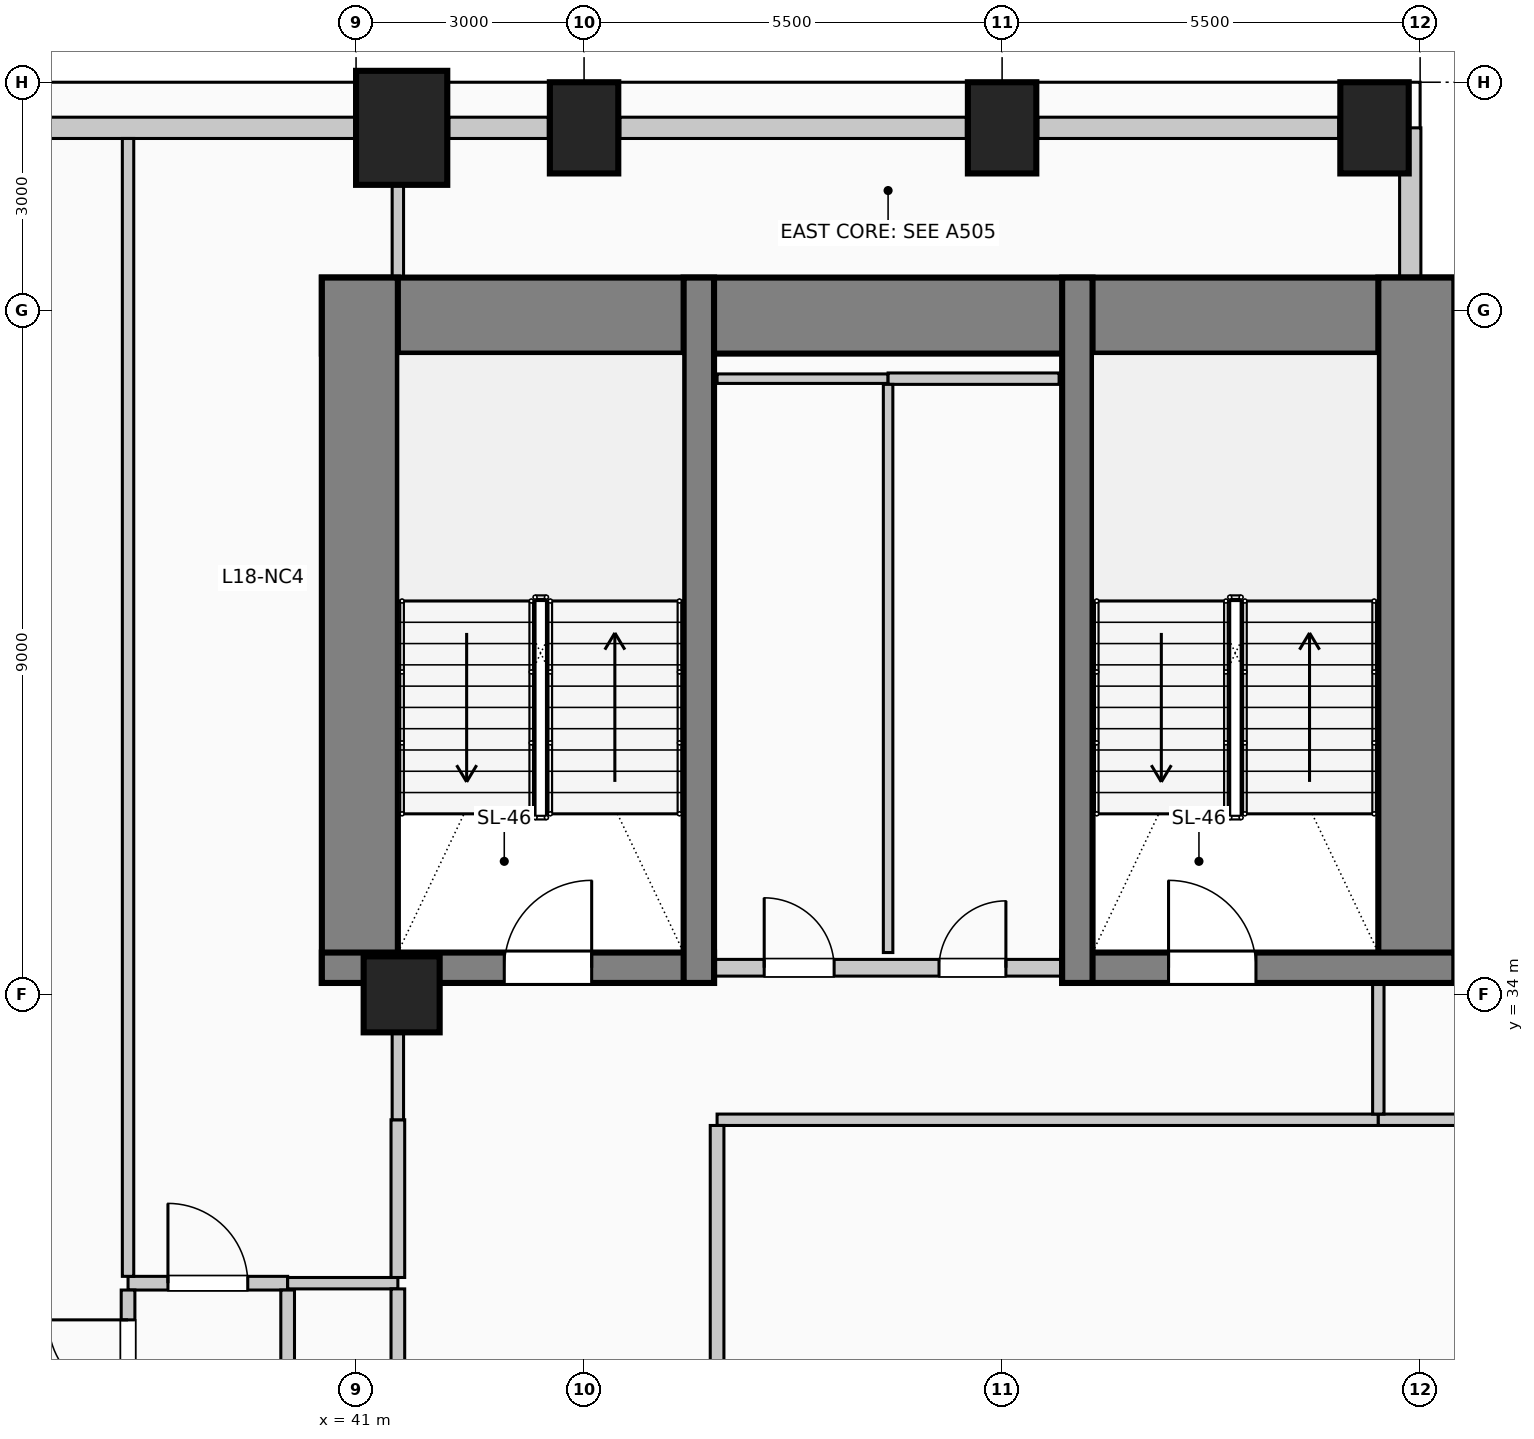
"""IFC4 building model, lengths in metres.
Left out: names, types, materials, properties, quantities, classifications, styles, units other than length and angle.
Written with IfcOpenShell. Run it as: python <this file> out.ifc"""

import sys

from ifc_helpers import new_model, si_unit, direction, frame, frame_2d, origin, origin_2d, place, context, subcontext, project, spatial, rectangle, circle, extrude, element, fill, save


model = new_model("IFC4")
c1 = context("Model", 3, precision=1e-05, world=origin(), true_north=direction((0.0, 1.0)))
c2 = subcontext(c1, "Body", "Model", "MODEL_VIEW")
j1 = project(units=[si_unit("LENGTHUNIT", "METRE"), si_unit("PLANEANGLEUNIT", "RADIAN")], contexts=[c1])
p1 = place(None, origin())
s1 = spatial("IfcSite", under=j1, at=p1, CompositionType="ELEMENT")
p2 = place(p1, origin())
s2 = spatial("IfcBuilding", under=s1, at=p2, CompositionType="ELEMENT")
p3 = place(p2, frame((0.0, 0.0, 74.6)))
s3 = spatial("IfcBuildingStorey", under=s2, at=p3, CompositionType="ELEMENT", Elevation=74.6)
p4 = place(p3, frame((40.55, 42.93, 0.0), z_axis=(0.0, 0.0, 1.0), x_axis=(1.0, 0.0, 0.0)))
e1 = element("IfcWall", 1, at=p4, inside=s3, PredefinedType="SHEAR", context=c2, shape_type="SweptSolid", body=[
    extrude(rectangle(XDim=14.9, YDim=1.0, at=frame_2d((7.45, 0.0))), origin(), (0.0, 0.0, 1.0), 4.0),
])
for number, where, z_axis, x_axis in (
    (2, (41.05, 34.15, 0.0), (0.0, 0.0, 1.0), (0.0, 1.0, 0.0)),
    (3, (54.95, 34.15, 0.0), (0.0, 0.0, 1.0), (0.0, 1.0, 0.0)),
):
    element("IfcWall", number, at=place(p3, frame(where, z_axis=z_axis, x_axis=x_axis)), inside=s3, PredefinedType="SHEAR", context=c2, shape_type="SweptSolid", body=[
        extrude(rectangle(XDim=9.28, YDim=1.0, at=frame_2d((4.64, 0.0))), origin(), (0.0, 0.0, 1.0), 4.0),
    ])
p5 = place(p3, frame((40.55, 34.35, 0.0), z_axis=(0.0, 0.0, 1.0), x_axis=(1.0, 0.0, 0.0)))
e4 = element("IfcWall", 4, at=p5, inside=s3, PredefinedType="SHEAR", context=c2, shape_type="SweptSolid", body=[
    extrude(rectangle(XDim=5.16, YDim=0.4, at=frame_2d((2.58, 0.0))), origin(), (0.0, 0.0, 1.0), 4.0),
])
p6 = place(p5, frame((2.4, 0.0, 0.0)))
e5 = element("IfcOpeningElement", 5, at=p6, cuts=e4, PredefinedType="OPENING", context=c2, shape_type="SweptSolid", body=[
    extrude(rectangle(XDim=1.15, YDim=2.2, at=frame_2d((0.575, 1.1))), frame((0.0, 0.21, 0.0), z_axis=(0.0, -1.0, 0.0), x_axis=(1.0, 0.0, 0.0)), (0.0, 0.0, 1.0), 0.42),
])
p7 = place(p3, frame((45.51, 34.15, 0.0), z_axis=(0.0, 0.0, 1.0), x_axis=(0.0, 1.0, 0.0)))
e6 = element("IfcWall", 6, at=p7, inside=s3, PredefinedType="SHEAR", context=c2, shape_type="SweptSolid", body=[
    extrude(rectangle(XDim=9.28, YDim=0.4, at=frame_2d((4.64, 0.0))), origin(), (0.0, 0.0, 1.0), 4.0),
])
p8 = place(p3, frame((50.29, 34.35, 0.0), z_axis=(0.0, 0.0, 1.0), x_axis=(1.0, 0.0, 0.0)))
e7 = element("IfcWall", 7, at=p8, inside=s3, PredefinedType="SHEAR", context=c2, shape_type="SweptSolid", body=[
    extrude(rectangle(XDim=5.16, YDim=0.4, at=frame_2d((2.58, 0.0))), origin(), (0.0, 0.0, 1.0), 4.0),
])
p9 = place(p8, frame((1.4, 0.0, 0.0)))
e8 = element("IfcOpeningElement", 8, at=p9, cuts=e7, PredefinedType="OPENING", context=c2, shape_type="SweptSolid", body=[
    extrude(rectangle(XDim=1.15, YDim=2.2, at=frame_2d((0.575, 1.1))), frame((0.0, 0.21, 0.0), z_axis=(0.0, -1.0, 0.0), x_axis=(1.0, 0.0, 0.0)), (0.0, 0.0, 1.0), 0.42),
])
p10 = place(p3, frame((50.49, 34.15, 0.0), z_axis=(0.0, 0.0, 1.0), x_axis=(0.0, 1.0, 0.0)))
e9 = element("IfcWall", 9, at=p10, inside=s3, PredefinedType="SHEAR", context=c2, shape_type="SweptSolid", body=[
    extrude(rectangle(XDim=9.28, YDim=0.4, at=frame_2d((4.64, 0.0))), origin(), (0.0, 0.0, 1.0), 4.0),
])
p11 = place(p3, frame((41.6, 45.4, 0.0), z_axis=(0.0, 0.0, 1.0), x_axis=(1.0, 0.0, 0.0)))
e10 = element("IfcColumn", 10, at=p11, inside=s3, PredefinedType="COLUMN", context=c2, shape_type="SweptSolid", body=[
    extrude(rectangle(XDim=1.2, YDim=1.5, at=origin_2d()), origin(), (0.0, 0.0, 1.0), 4.0),
])
for number, where, z_axis, x_axis in (
    (11, (44.0, 45.4, 0.0), (0.0, 0.0, 1.0), (1.0, 0.0, 0.0)),
    (12, (49.5, 45.4, 0.0), (0.0, 0.0, 1.0), (1.0, 0.0, 0.0)),
    (13, (54.4, 45.4, 0.0), (0.0, 0.0, 1.0), (1.0, 0.0, 0.0)),
):
    element("IfcColumn", number, at=place(p3, frame(where, z_axis=z_axis, x_axis=x_axis)), inside=s3, PredefinedType="COLUMN", context=c2, shape_type="SweptSolid", body=[
        extrude(rectangle(XDim=0.9, YDim=1.2, at=origin_2d()), origin(), (0.0, 0.0, 1.0), 4.0),
    ])
p12 = place(p3, frame((41.6, 34.0, 0.0), z_axis=(0.0, 0.0, 1.0), x_axis=(1.0, 0.0, 0.0)))
e14 = element("IfcColumn", 14, at=p12, inside=s3, PredefinedType="COLUMN", context=c2, shape_type="SweptSolid", body=[
    extrude(circle(Radius=0.5, at=origin_2d()), origin(), (0.0, 0.0, 1.0), 4.0),
])
p13 = place(p3, frame((34.62, 45.4, 0.0), z_axis=(0.0, 0.0, 1.0), x_axis=(1.0, 0.0, 0.0)))
e15 = element("IfcWall", 15, at=p13, inside=s3, PredefinedType="SOLIDWALL", context=c2, shape_type="SweptSolid", body=[
    extrude(rectangle(XDim=6.36, YDim=0.28, at=frame_2d((3.18, 0.0))), origin(), (0.0, 0.0, 1.0), 2.85),
])
p14 = place(p3, frame((42.22, 45.4, 0.0), z_axis=(0.0, 0.0, 1.0), x_axis=(1.0, 0.0, 0.0)))
e16 = element("IfcWall", 16, at=p14, inside=s3, PredefinedType="SOLIDWALL", context=c2, shape_type="SweptSolid", body=[
    extrude(rectangle(XDim=1.31, YDim=0.28, at=frame_2d((0.655, 0.0))), origin(), (0.0, 0.0, 1.0), 2.85),
])
p15 = place(p3, frame((44.47, 45.4, 0.0), z_axis=(0.0, 0.0, 1.0), x_axis=(1.0, 0.0, 0.0)))
e17 = element("IfcWall", 17, at=p15, inside=s3, PredefinedType="SOLIDWALL", context=c2, shape_type="SweptSolid", body=[
    extrude(rectangle(XDim=4.56, YDim=0.28, at=frame_2d((2.28, 0.0))), origin(), (0.0, 0.0, 1.0), 2.85),
])
p16 = place(p3, frame((49.97, 45.4, 0.0), z_axis=(0.0, 0.0, 1.0), x_axis=(1.0, 0.0, 0.0)))
e18 = element("IfcWall", 18, at=p16, inside=s3, PredefinedType="SOLIDWALL", context=c2, shape_type="SweptSolid", body=[
    extrude(rectangle(XDim=3.96, YDim=0.28, at=frame_2d((1.98, 0.0))), origin(), (0.0, 0.0, 1.0), 2.85),
])
p17 = place(p3, frame((54.87, 45.4, 0.0), z_axis=(0.0, 0.0, 1.0), x_axis=(0.0, -1.0, 0.0)))
e19 = element("IfcWall", 19, at=p17, inside=s3, PredefinedType="SOLIDWALL", context=c2, shape_type="SweptSolid", body=[
    extrude(rectangle(XDim=1.965, YDim=0.28, at=frame_2d((0.982, 0.0))), origin(), (0.0, 0.0, 1.0), 3.7),
])
p18 = place(p3, frame((45.72, 34.35, 0.0), z_axis=(0.0, 0.0, 1.0), x_axis=(1.0, 0.0, 0.0)))
e20 = element("IfcWall", 20, at=p18, inside=s3, PredefinedType="PARTITIONING", context=c2, shape_type="SweptSolid", body=[
    extrude(rectangle(XDim=4.56, YDim=0.22, at=frame_2d((2.28, 0.0))), origin(), (0.0, 0.0, 1.0), 3.7),
])
p19 = place(p18, frame((0.65, 0.0, 0.0)))
e21 = element("IfcOpeningElement", 21, at=p19, cuts=e20, PredefinedType="OPENING", context=c2, shape_type="SweptSolid", body=[
    extrude(rectangle(XDim=0.92, YDim=2.1, at=frame_2d((0.46, 1.05))), frame((0.0, 0.12, 0.0), z_axis=(0.0, -1.0, 0.0), x_axis=(1.0, 0.0, 0.0)), (0.0, 0.0, 1.0), 0.24),
])
p20 = place(p18, frame((2.95, 0.0, 0.0)))
e22 = element("IfcOpeningElement", 22, at=p20, cuts=e20, PredefinedType="OPENING", context=c2, shape_type="SweptSolid", body=[
    extrude(rectangle(XDim=0.88, YDim=2.1, at=frame_2d((0.44, 1.05))), frame((0.0, 0.12, 0.0), z_axis=(0.0, -1.0, 0.0), x_axis=(1.0, 0.0, 0.0)), (0.0, 0.0, 1.0), 0.24),
])
p21 = place(p3, frame((38.0, 30.2, 0.0), z_axis=(0.0, 0.0, 1.0), x_axis=(1.0, 0.0, 0.0)))
e23 = element("IfcWall", 23, at=p21, inside=s3, PredefinedType="PARTITIONING", context=c2, shape_type="SweptSolid", body=[
    extrude(rectangle(XDim=2.1, YDim=0.18, at=frame_2d((1.05, 0.0))), origin(), (0.0, 0.0, 1.0), 3.7),
])
p22 = place(p21, frame((0.525, 0.0, 0.0)))
e24 = element("IfcOpeningElement", 24, at=p22, cuts=e23, PredefinedType="OPENING", context=c2, shape_type="SweptSolid", body=[
    extrude(rectangle(XDim=1.05, YDim=2.15, at=frame_2d((0.525, 1.075))), frame((0.0, 0.1, 0.0), z_axis=(0.0, -1.0, 0.0), x_axis=(1.0, 0.0, 0.0)), (0.0, 0.0, 1.0), 0.2),
])
p23 = place(p3, frame((40.1, 30.2, 0.0), z_axis=(0.0, 0.0, 1.0), x_axis=(1.0, 0.0, 0.0)))
e25 = element("IfcWall", 25, at=p23, inside=s3, PredefinedType="PARTITIONING", context=c2, shape_type="SweptSolid", body=[
    extrude(rectangle(XDim=1.45, YDim=0.15, at=frame_2d((0.725, 0.0))), origin(), (0.0, 0.0, 1.0), 3.7),
])
p24 = place(p3, frame((45.75, 32.35, 0.0), z_axis=(0.0, 0.0, 1.0), x_axis=(1.0, 0.0, 0.0)))
e26 = element("IfcWall", 26, at=p24, inside=s3, PredefinedType="PARTITIONING", context=c2, shape_type="SweptSolid", body=[
    extrude(rectangle(XDim=8.7, YDim=0.15, at=frame_2d((4.35, 0.0))), origin(), (0.0, 0.0, 1.0), 3.7),
])
p25 = place(p3, frame((54.45, 32.35, 0.0), z_axis=(0.0, 0.0, 1.0), x_axis=(1.0, 0.0, 0.0)))
e27 = element("IfcWall", 27, at=p25, inside=s3, PredefinedType="PARTITIONING", context=c2, shape_type="SweptSolid", body=[
    extrude(rectangle(XDim=2.81, YDim=0.15, at=frame_2d((1.405, 0.0))), origin(), (0.0, 0.0, 1.0), 3.7),
])
p26 = place(p3, frame((45.75, 42.1, 0.0), z_axis=(0.0, 0.0, 1.0), x_axis=(1.0, 0.0, 0.0)))
e28 = element("IfcWall", 28, at=p26, inside=s3, PredefinedType="PARTITIONING", context=c2, shape_type="SweptSolid", body=[
    extrude(rectangle(XDim=2.25, YDim=0.125, at=frame_2d((1.125, 0.0))), origin(), (0.0, 0.0, 1.0), 3.7),
])
p27 = place(p3, frame((48.0, 42.1, 0.0), z_axis=(0.0, 0.0, 1.0), x_axis=(1.0, 0.0, 0.0)))
e29 = element("IfcWall", 29, at=p27, inside=s3, PredefinedType="PARTITIONING", context=c2, shape_type="SweptSolid", body=[
    extrude(rectangle(XDim=2.25, YDim=0.15, at=frame_2d((1.125, 0.0))), origin(), (0.0, 0.0, 1.0), 3.7),
])
p28 = place(p3, frame((38.0, 28.275, 0.0), z_axis=(0.0, 0.0, 1.0), x_axis=(0.0, 1.0, 0.0)))
e30 = element("IfcWall", 30, at=p28, inside=s3, PredefinedType="PARTITIONING", context=c2, shape_type="SweptSolid", body=[
    extrude(rectangle(XDim=1.835, YDim=0.18, at=frame_2d((0.917, 0.0))), origin(), (0.0, 0.0, 1.0), 3.7),
])
p29 = place(p28, frame((0.393, 0.0, 0.0)))
e31 = element("IfcOpeningElement", 31, at=p29, cuts=e30, PredefinedType="OPENING", context=c2, shape_type="SweptSolid", body=[
    extrude(rectangle(XDim=1.05, YDim=2.15, at=frame_2d((0.525, 1.075))), frame((0.0, 0.1, 0.0), z_axis=(0.0, -1.0, 0.0), x_axis=(1.0, 0.0, 0.0)), (0.0, 0.0, 1.0), 0.2),
])
p30 = place(p3, frame((38.0, 30.29, 0.0), z_axis=(0.0, 0.0, 1.0), x_axis=(0.0, 1.0, 0.0)))
e32 = element("IfcWall", 32, at=p30, inside=s3, PredefinedType="PARTITIONING", context=c2, shape_type="SweptSolid", body=[
    extrude(rectangle(XDim=14.97, YDim=0.15, at=frame_2d((7.485, 0.0))), origin(), (0.0, 0.0, 1.0), 3.7),
])
p31 = place(p3, frame((40.1, 20.29, 0.0), z_axis=(0.0, 0.0, 1.0), x_axis=(0.0, 1.0, 0.0)))
e33 = element("IfcWall", 33, at=p31, inside=s3, PredefinedType="PARTITIONING", context=c2, shape_type="SweptSolid", body=[
    extrude(rectangle(XDim=9.82, YDim=0.18, at=frame_2d((4.91, 0.0))), origin(), (0.0, 0.0, 1.0), 3.7),
])
p32 = place(p3, frame((41.55, 20.29, 0.0), z_axis=(0.0, 0.0, 1.0), x_axis=(0.0, 1.0, 0.0)))
e34 = element("IfcWall", 34, at=p32, inside=s3, PredefinedType="PARTITIONING", context=c2, shape_type="SweptSolid", body=[
    extrude(rectangle(XDim=9.835, YDim=0.18, at=frame_2d((4.917, 0.0))), origin(), (0.0, 0.0, 1.0), 2.995),
])
p33 = place(p3, frame((41.55, 30.275, 0.0), z_axis=(0.0, 0.0, 1.0), x_axis=(0.0, 1.0, 0.0)))
e35 = element("IfcWall", 35, at=p33, inside=s3, PredefinedType="PARTITIONING", context=c2, shape_type="SweptSolid", body=[
    extrude(rectangle(XDim=2.075, YDim=0.18, at=frame_2d((1.038, 0.0))), origin(), (0.0, 0.0, 1.0), 2.995),
])
p34 = place(p3, frame((41.55, 32.35, 0.0), z_axis=(0.0, 0.0, 1.0), x_axis=(0.0, 1.0, 0.0)))
e36 = element("IfcWall", 36, at=p34, inside=s3, PredefinedType="PARTITIONING", context=c2, shape_type="SweptSolid", body=[
    extrude(rectangle(XDim=1.15, YDim=0.15, at=frame_2d((0.575, 0.0))), origin(), (0.0, 0.0, 1.0), 2.995),
])
p35 = place(p3, frame((41.55, 43.43, 0.0), z_axis=(0.0, 0.0, 1.0), x_axis=(0.0, 1.0, 0.0)))
e37 = element("IfcWall", 37, at=p35, inside=s3, PredefinedType="PARTITIONING", context=c2, shape_type="SweptSolid", body=[
    extrude(rectangle(XDim=1.22, YDim=0.15, at=frame_2d((0.61, 0.0))), origin(), (0.0, 0.0, 1.0), 3.7),
])
p36 = place(p3, frame((45.75, 20.29, 0.0), z_axis=(0.0, 0.0, 1.0), x_axis=(0.0, 1.0, 0.0)))
e38 = element("IfcWall", 38, at=p36, inside=s3, PredefinedType="PARTITIONING", context=c2, shape_type="SweptSolid", body=[
    extrude(rectangle(XDim=11.985, YDim=0.18, at=frame_2d((5.992, 0.0))), origin(), (0.0, 0.0, 1.0), 3.7),
])
p37 = place(p3, frame((48.0, 34.55, 0.0), z_axis=(0.0, 0.0, 1.0), x_axis=(0.0, 1.0, 0.0)))
e39 = element("IfcWall", 39, at=p37, inside=s3, PredefinedType="PARTITIONING", context=c2, shape_type="SweptSolid", body=[
    extrude(rectangle(XDim=7.475, YDim=0.125, at=frame_2d((3.737, 0.0))), origin(), (0.0, 0.0, 1.0), 3.7),
])
p38 = place(p3, frame((54.45, 32.425, 0.0), z_axis=(0.0, 0.0, 1.0), x_axis=(0.0, 1.0, 0.0)))
e40 = element("IfcWall", 40, at=p38, inside=s3, PredefinedType="PARTITIONING", context=c2, shape_type="SweptSolid", body=[
    extrude(rectangle(XDim=1.725, YDim=0.15, at=frame_2d((0.862, 0.0))), origin(), (0.0, 0.0, 1.0), 3.7),
])
p39 = place(p6, origin())
e41 = element("IfcDoor", 41, at=p39, inside=s3, OperationType="SINGLE_SWING_RIGHT", PredefinedType="DOOR", context=c2, shape_type="SweptSolid", body=[
    extrude(rectangle(XDim=1.15, YDim=2.2, at=frame_2d((0.575, 1.1))), frame((0.0, 0.025, 0.0), z_axis=(0.0, -1.0, 0.0), x_axis=(1.0, 0.0, 0.0)), (0.0, 0.0, 1.0), 0.05),
])
fill(e5, e41)
p40 = place(p19, origin())
e42 = element("IfcDoor", 42, at=p40, inside=s3, OperationType="SINGLE_SWING_LEFT", PredefinedType="DOOR", context=c2, shape_type="SweptSolid", body=[
    extrude(rectangle(XDim=0.92, YDim=2.1, at=frame_2d((0.46, 1.05))), frame((0.0, 0.025, 0.0), z_axis=(0.0, -1.0, 0.0), x_axis=(1.0, 0.0, 0.0)), (0.0, 0.0, 1.0), 0.05),
])
fill(e21, e42)
p41 = place(p20, origin())
e43 = element("IfcDoor", 43, at=p41, inside=s3, OperationType="SINGLE_SWING_RIGHT", PredefinedType="DOOR", context=c2, shape_type="SweptSolid", body=[
    extrude(rectangle(XDim=0.88, YDim=2.1, at=frame_2d((0.44, 1.05))), frame((0.0, 0.025, 0.0), z_axis=(0.0, -1.0, 0.0), x_axis=(1.0, 0.0, 0.0)), (0.0, 0.0, 1.0), 0.05),
])
fill(e22, e43)
p42 = place(p9, origin())
e44 = element("IfcDoor", 44, at=p42, inside=s3, OperationType="SINGLE_SWING_LEFT", PredefinedType="DOOR", context=c2, shape_type="SweptSolid", body=[
    extrude(rectangle(XDim=1.15, YDim=2.2, at=frame_2d((0.575, 1.1))), frame((0.0, 0.025, 0.0), z_axis=(0.0, -1.0, 0.0), x_axis=(1.0, 0.0, 0.0)), (0.0, 0.0, 1.0), 0.05),
])
fill(e8, e44)
p43 = place(p22, origin())
e45 = element("IfcDoor", 45, at=p43, inside=s3, OperationType="SINGLE_SWING_LEFT", PredefinedType="DOOR", context=c2, shape_type="SweptSolid", body=[
    extrude(rectangle(XDim=1.05, YDim=2.15, at=frame_2d((0.525, 1.075))), frame((0.0, 0.025, 0.0), z_axis=(0.0, -1.0, 0.0), x_axis=(1.0, 0.0, 0.0)), (0.0, 0.0, 1.0), 0.05),
])
fill(e24, e45)
p44 = place(p29, origin())
e46 = element("IfcDoor", 46, at=p44, inside=s3, OperationType="SINGLE_SWING_RIGHT", PredefinedType="DOOR", context=c2, shape_type="SweptSolid", body=[
    extrude(rectangle(XDim=1.05, YDim=2.15, at=frame_2d((0.525, 1.075))), frame((0.0, 0.025, 0.0), z_axis=(0.0, -1.0, 0.0), x_axis=(1.0, 0.0, 0.0)), (0.0, 0.0, 1.0), 0.05),
])
fill(e31, e46)
save(model, sys.argv[1])
